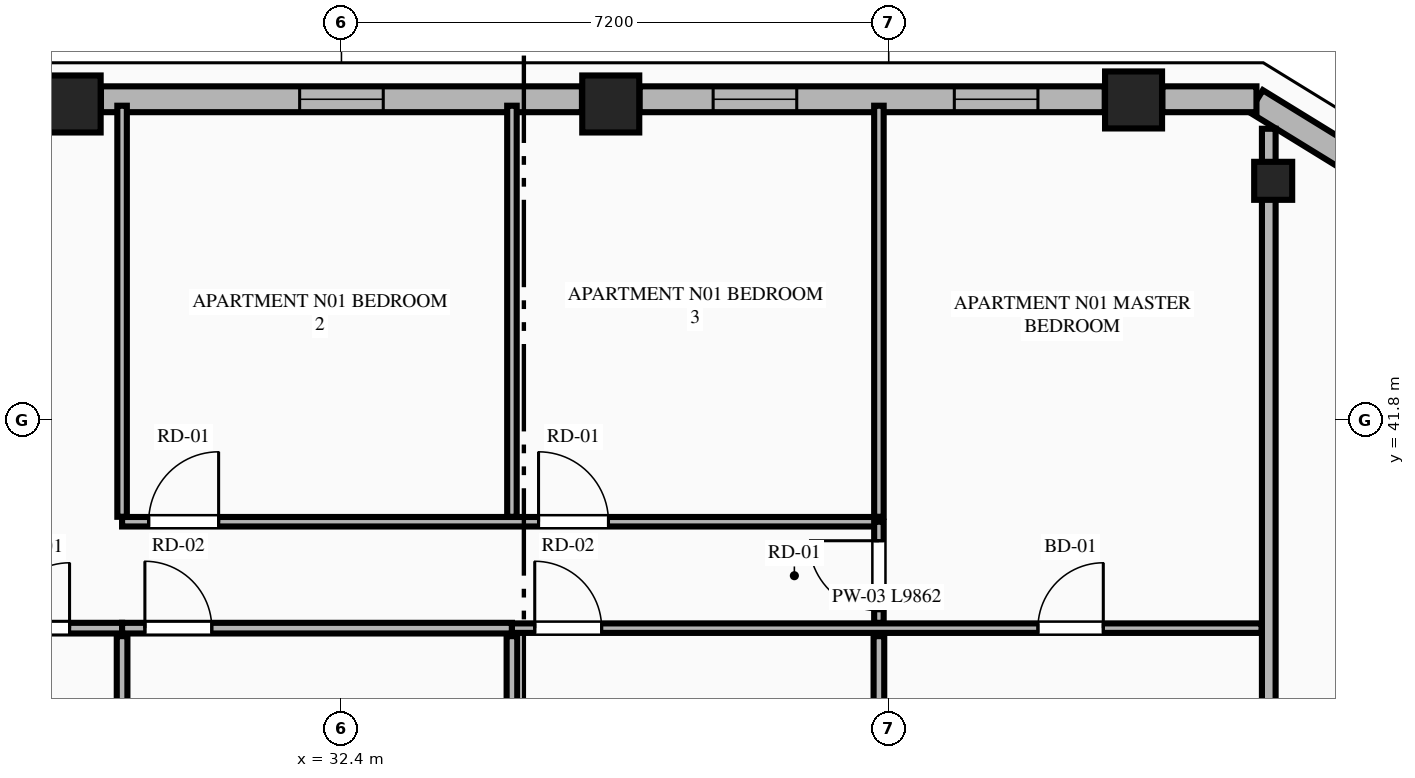
"""IFC4 building model, lengths in metres.
Left out: names, types, materials, properties, quantities, classifications, styles, units other than length and angle.
Written with IfcOpenShell. Run it as: python <this file> out.ifc"""

import sys

from ifc_helpers import new_model, si_unit, direction, frame, frame_2d, origin, origin_2d, place, context, subcontext, project, spatial, rectangle, extrude, element, fill, save


model = new_model("IFC4")
c1 = context("Model", 3, precision=1e-05, world=origin(), true_north=direction((0.0, 1.0)))
c2 = subcontext(c1, "Body", "Model", "MODEL_VIEW")
j1 = project(units=[si_unit("LENGTHUNIT", "METRE"), si_unit("PLANEANGLEUNIT", "RADIAN")], contexts=[c1])
p1 = place(None, origin())
s1 = spatial("IfcSite", under=j1, at=p1, CompositionType="ELEMENT")
p2 = place(p1, origin())
s2 = spatial("IfcBuilding", under=s1, at=p2, CompositionType="ELEMENT")
p3 = place(p2, frame((0.0, 0.0, 210.95)))
s3 = spatial("IfcBuildingStorey", under=s2, at=p3, CompositionType="ELEMENT", Elevation=210.95)
for number, where, z_axis, x_axis in (
    (1, (42.821, 46.011, 0.0), (0.0, 0.0, 1.0), (1.0, 0.0, 0.0)),
    (2, (35.943, 45.958, 0.0), (0.0, 0.0, 1.0), (1.0, 0.0, 0.0)),
    (3, (28.857, 45.958, 0.0), (0.0, 0.0, 1.0), (1.0, 0.0, 0.0)),
):
    element("IfcColumn", number, at=place(p3, frame(where, z_axis=z_axis, x_axis=x_axis)), inside=s3, PredefinedType="COLUMN", context=c2, shape_type="SweptSolid", body=[
        extrude(rectangle(XDim=0.75, YDim=0.75, at=origin_2d()), origin(), (0.0, 0.0, 1.0), 3.55),
    ])
p4 = place(p3, frame((44.658, 44.947, 0.0), z_axis=(0.0, 0.0, 1.0), x_axis=(-0.865230187018, 0.501374833306, 0.0)))
e4 = element("IfcColumn", 4, at=p4, inside=s3, PredefinedType="PILASTER", context=c2, shape_type="SweptSolid", body=[
    extrude(rectangle(XDim=0.5, YDim=0.35, at=origin_2d()), origin(), (0.0, 0.0, 1.0), 3.55),
])
p5 = place(p3, frame((45.862, 45.116, 0.0), z_axis=(0.0, 0.0, 1.0), x_axis=(-0.851713271379, 0.524008113828, 0.0)))
e5 = element("IfcWall", 5, at=p5, inside=s3, PredefinedType="STANDARD", context=c2, shape_type="SweptSolid", body=[
    extrude(rectangle(XDim=1.678, YDim=0.34, at=frame_2d((0.839, 0.0))), origin(), (0.0, 0.0, 1.0), 3.35),
])
p6 = place(p3, frame((44.438, 46.02, 0.0), z_axis=(0.0, 0.0, 1.0), x_axis=(-1.0, 0.0, 0.0)))
e6 = element("IfcWall", 6, at=p6, inside=s3, PredefinedType="STANDARD", context=c2, shape_type="SweptSolid", body=[
    extrude(rectangle(XDim=1.238, YDim=0.34, at=frame_2d((0.619, 0.0))), origin(), (0.0, 0.0, 1.0), 3.35),
])
p7 = place(p3, frame((42.442, 46.02, 0.0), z_axis=(0.0, 0.0, 1.0), x_axis=(-1.0, 0.0, 0.0)))
e7 = element("IfcWall", 7, at=p7, inside=s3, PredefinedType="STANDARD", context=c2, shape_type="SweptSolid", body=[
    extrude(rectangle(XDim=6.12, YDim=0.34, at=frame_2d((3.06, 0.0))), origin(), (0.0, 0.0, 1.0), 2.883),
])
p8 = place(p7, frame((0.879, 0.0, 0.75)))
e8 = element("IfcOpeningElement", 8, at=p8, cuts=e7, PredefinedType="OPENING", context=c2, shape_type="SweptSolid", body=[
    extrude(rectangle(XDim=1.1, YDim=1.983, at=frame_2d((0.55, 0.991))), frame((0.0, 0.18, 0.0), z_axis=(0.0, -1.0, 0.0), x_axis=(1.0, 0.0, 0.0)), (0.0, 0.0, 1.0), 0.36),
])
p9 = place(p7, frame((4.052, 0.0, 0.75)))
e9 = element("IfcOpeningElement", 9, at=p9, cuts=e7, PredefinedType="OPENING", context=c2, shape_type="SweptSolid", body=[
    extrude(rectangle(XDim=1.1, YDim=1.983, at=frame_2d((0.55, 0.991))), frame((0.0, 0.18, 0.0), z_axis=(0.0, -1.0, 0.0), x_axis=(1.0, 0.0, 0.0)), (0.0, 0.0, 1.0), 0.36),
])
p10 = place(p3, frame((35.564, 46.02, 0.0), z_axis=(0.0, 0.0, 1.0), x_axis=(-1.0, 0.0, 0.0)))
e10 = element("IfcWall", 10, at=p10, inside=s3, PredefinedType="STANDARD", context=c2, shape_type="SweptSolid", body=[
    extrude(rectangle(XDim=6.328, YDim=0.34, at=frame_2d((3.164, 0.0))), origin(), (0.0, 0.0, 1.0), 2.883),
])
p11 = place(p10, frame((2.614, 0.0, 0.75)))
e11 = element("IfcOpeningElement", 11, at=p11, cuts=e10, PredefinedType="OPENING", context=c2, shape_type="SweptSolid", body=[
    extrude(rectangle(XDim=1.1, YDim=1.983, at=frame_2d((0.55, 0.991))), frame((0.0, 0.18, 0.0), z_axis=(0.0, -1.0, 0.0), x_axis=(1.0, 0.0, 0.0)), (0.0, 0.0, 1.0), 0.36),
])
p12 = place(p3, frame((44.6, 35.15, 0.0), z_axis=(0.0, 0.0, 1.0), x_axis=(0.0, 1.0, 0.0)))
e12 = element("IfcWall", 12, at=p12, inside=s3, PredefinedType="PARTITIONING", context=c2, shape_type="SweptSolid", body=[
    extrude(rectangle(XDim=10.482, YDim=0.18, at=frame_2d((5.241, 0.0))), origin(), (0.0, 0.0, 1.0), 3.35),
])
p13 = place(p3, frame((22.25, 39.062, 0.0), z_axis=(0.0, 0.0, 1.0), x_axis=(1.0, 0.0, 0.0)))
e13 = element("IfcWall", 13, at=p13, inside=s3, PredefinedType="PLUMBINGWALL", context=c2, shape_type="SweptSolid", body=[
    extrude(rectangle(XDim=7.264, YDim=0.14, at=frame_2d((3.632, 0.0))), origin(), (0.0, 0.0, 1.0), 3.35),
])
p14 = place(p13, frame((5.713, 0.0, 0.0)))
e14 = element("IfcOpeningElement", 14, at=p14, cuts=e13, PredefinedType="OPENING", context=c2, shape_type="SweptSolid", body=[
    extrude(rectangle(XDim=0.86, YDim=2.1, at=frame_2d((0.43, 1.05))), frame((0.0, 0.08, 0.0), z_axis=(0.0, -1.0, 0.0), x_axis=(1.0, 0.0, 0.0)), (0.0, 0.0, 1.0), 0.16),
])
p15 = place(p13, frame((0.26, 0.0, 0.0)))
e15 = element("IfcOpeningElement", 15, at=p15, cuts=e13, PredefinedType="OPENING", context=c2, shape_type="SweptSolid", body=[
    extrude(rectangle(XDim=0.88, YDim=2.15, at=frame_2d((0.44, 1.075))), frame((0.0, 0.08, 0.0), z_axis=(0.0, -1.0, 0.0), x_axis=(1.0, 0.0, 0.0)), (0.0, 0.0, 1.0), 0.16),
])
p16 = place(p13, frame((3.446, 0.0, 0.0)))
e16 = element("IfcOpeningElement", 16, at=p16, cuts=e13, PredefinedType="OPENING", context=c2, shape_type="SweptSolid", body=[
    extrude(rectangle(XDim=0.88, YDim=2.15, at=frame_2d((0.44, 1.075))), frame((0.0, 0.08, 0.0), z_axis=(0.0, -1.0, 0.0), x_axis=(1.0, 0.0, 0.0)), (0.0, 0.0, 1.0), 0.16),
])
p17 = place(p3, frame((29.514, 39.062, 0.0), z_axis=(0.0, 0.0, 1.0), x_axis=(1.0, 0.0, 0.0)))
e17 = element("IfcWall", 17, at=p17, inside=s3, PredefinedType="PLUMBINGWALL", context=c2, shape_type="SweptSolid", body=[
    extrude(rectangle(XDim=5.129, YDim=0.14, at=frame_2d((2.564, 0.0))), origin(), (0.0, 0.0, 1.0), 3.35),
])
p18 = place(p17, frame((0.3, 0.0, 0.0)))
e18 = element("IfcOpeningElement", 18, at=p18, cuts=e17, PredefinedType="OPENING", context=c2, shape_type="SweptSolid", body=[
    extrude(rectangle(XDim=0.88, YDim=2.15, at=frame_2d((0.44, 1.075))), frame((0.0, 0.08, 0.0), z_axis=(0.0, -1.0, 0.0), x_axis=(1.0, 0.0, 0.0)), (0.0, 0.0, 1.0), 0.16),
])
p19 = place(p3, frame((34.643, 39.062, 0.0), z_axis=(0.0, 0.0, 1.0), x_axis=(1.0, 0.0, 0.0)))
e19 = element("IfcWall", 19, at=p19, inside=s3, PredefinedType="PARTITIONING", context=c2, shape_type="SweptSolid", body=[
    extrude(rectangle(XDim=9.862, YDim=0.125, at=frame_2d((4.931, 0.0))), origin(), (0.0, 0.0, 1.0), 3.35),
])
p20 = place(p19, frame((6.92, 0.0, 0.0)))
e20 = element("IfcOpeningElement", 20, at=p20, cuts=e19, PredefinedType="OPENING", context=c2, shape_type="SweptSolid", body=[
    extrude(rectangle(XDim=0.86, YDim=2.1, at=frame_2d((0.43, 1.05))), frame((0.0, 0.073, 0.0), z_axis=(0.0, -1.0, 0.0), x_axis=(1.0, 0.0, 0.0)), (0.0, 0.0, 1.0), 0.145),
])
p21 = place(p19, frame((0.3, 0.0, 0.0)))
e21 = element("IfcOpeningElement", 21, at=p21, cuts=e19, PredefinedType="OPENING", context=c2, shape_type="SweptSolid", body=[
    extrude(rectangle(XDim=0.88, YDim=2.15, at=frame_2d((0.44, 1.075))), frame((0.0, 0.073, 0.0), z_axis=(0.0, -1.0, 0.0), x_axis=(1.0, 0.0, 0.0)), (0.0, 0.0, 1.0), 0.145),
])
p22 = place(p3, frame((29.514, 40.527, 0.0), z_axis=(0.0, 0.0, 1.0), x_axis=(0.0, 1.0, 0.0)))
e22 = element("IfcWall", 22, at=p22, inside=s3, PredefinedType="PARTITIONING", context=c2, shape_type="SweptSolid", body=[
    extrude(rectangle(XDim=5.408, YDim=0.125, at=frame_2d((2.704, 0.0))), origin(), (0.0, 0.0, 1.0), 3.35),
])
p23 = place(p3, frame((29.514, 40.462, 0.0), z_axis=(0.0, 0.0, 1.0), x_axis=(1.0, 0.0, 0.0)))
e23 = element("IfcWall", 23, at=p23, inside=s3, PredefinedType="PARTITIONING", context=c2, shape_type="SweptSolid", body=[
    extrude(rectangle(XDim=9.957, YDim=0.125, at=frame_2d((4.979, 0.0))), origin(), (0.0, 0.0, 1.0), 3.35),
])
p24 = place(p23, frame((0.35, 0.0, 0.0)))
e24 = element("IfcOpeningElement", 24, at=p24, cuts=e23, PredefinedType="OPENING", context=c2, shape_type="SweptSolid", body=[
    extrude(rectangle(XDim=0.92, YDim=2.15, at=frame_2d((0.46, 1.075))), frame((0.0, 0.073, 0.0), z_axis=(0.0, -1.0, 0.0), x_axis=(1.0, 0.0, 0.0)), (0.0, 0.0, 1.0), 0.145),
])
p25 = place(p23, frame((5.479, 0.0, 0.0)))
e25 = element("IfcOpeningElement", 25, at=p25, cuts=e23, PredefinedType="OPENING", context=c2, shape_type="SweptSolid", body=[
    extrude(rectangle(XDim=0.92, YDim=2.15, at=frame_2d((0.46, 1.075))), frame((0.0, 0.073, 0.0), z_axis=(0.0, -1.0, 0.0), x_axis=(1.0, 0.0, 0.0)), (0.0, 0.0, 1.0), 0.145),
])
p26 = place(p3, frame((39.471, 39.132, 0.0), z_axis=(0.0, 0.0, 1.0), x_axis=(0.0, 1.0, 0.0)))
e26 = element("IfcWall", 26, at=p26, inside=s3, PredefinedType="PARTITIONING", context=c2, shape_type="SweptSolid", body=[
    extrude(rectangle(XDim=1.33, YDim=0.125, at=frame_2d((0.665, 0.0))), origin(), (0.0, 0.0, 1.0), 3.35),
])
p27 = place(p26, frame((0.16, 0.0, 0.0)))
e27 = element("IfcOpeningElement", 27, at=p27, cuts=e26, PredefinedType="OPENING", context=c2, shape_type="SweptSolid", body=[
    extrude(rectangle(XDim=0.92, YDim=2.15, at=frame_2d((0.46, 1.075))), frame((0.0, 0.073, 0.0), z_axis=(0.0, -1.0, 0.0), x_axis=(1.0, 0.0, 0.0)), (0.0, 0.0, 1.0), 0.145),
])
for number, where, z_axis, x_axis in (
    (28, (29.514, 35.235, 0.0), (0.0, 0.0, 1.0), (0.0, 1.0, 0.0)),
    (29, (34.643, 35.235, 0.0), (0.0, 0.0, 1.0), (0.0, 1.0, 0.0)),
):
    element("IfcWall", number, at=place(p3, frame(where, z_axis=z_axis, x_axis=x_axis)), inside=s3, PredefinedType="PLUMBINGWALL", context=c2, shape_type="SweptSolid", body=[
        extrude(rectangle(XDim=3.722, YDim=0.14, at=frame_2d((1.861, 0.0))), origin(), (0.0, 0.0, 1.0), 3.35),
    ])
for number, where, z_axis, x_axis in (
    (30, (34.643, 40.527, 0.0), (0.0, 0.0, 1.0), (0.0, 1.0, 0.0)),
    (31, (39.471, 40.527, 0.0), (0.0, 0.0, 1.0), (0.0, 1.0, 0.0)),
):
    element("IfcWall", number, at=place(p3, frame(where, z_axis=z_axis, x_axis=x_axis)), inside=s3, PredefinedType="PARTITIONING", context=c2, shape_type="SweptSolid", body=[
        extrude(rectangle(XDim=5.408, YDim=0.125, at=frame_2d((2.704, 0.0))), origin(), (0.0, 0.0, 1.0), 3.35),
    ])
p28 = place(p3, frame((39.471, 35.235, 0.0), z_axis=(0.0, 0.0, 1.0), x_axis=(0.0, 1.0, 0.0)))
e32 = element("IfcWall", 32, at=p28, inside=s3, PredefinedType="PLUMBINGWALL", context=c2, shape_type="SweptSolid", body=[
    extrude(rectangle(XDim=3.722, YDim=0.14, at=frame_2d((1.861, 0.0))), origin(), (0.0, 0.0, 1.0), 3.35),
])
p29 = place(p8, origin())
e33 = element("IfcWindow", 33, at=p29, inside=s3, PartitioningType="SINGLE_PANEL", PredefinedType="WINDOW", context=c2, shape_type="SweptSolid", body=[
    extrude(rectangle(XDim=1.1, YDim=1.983, at=frame_2d((0.55, 0.991))), frame((0.0, 0.03, 0.0), z_axis=(0.0, -1.0, 0.0), x_axis=(1.0, 0.0, 0.0)), (0.0, 0.0, 1.0), 0.06),
])
fill(e8, e33)
p30 = place(p11, origin())
e34 = element("IfcWindow", 34, at=p30, inside=s3, PartitioningType="SINGLE_PANEL", PredefinedType="WINDOW", context=c2, shape_type="SweptSolid", body=[
    extrude(rectangle(XDim=1.1, YDim=1.983, at=frame_2d((0.55, 0.991))), frame((0.0, 0.03, 0.0), z_axis=(0.0, -1.0, 0.0), x_axis=(1.0, 0.0, 0.0)), (0.0, 0.0, 1.0), 0.06),
])
fill(e11, e34)
p31 = place(p14, origin())
e35 = element("IfcDoor", 35, at=p31, inside=s3, OperationType="SINGLE_SWING_RIGHT", PredefinedType="DOOR", context=c2, shape_type="SweptSolid", body=[
    extrude(rectangle(XDim=0.86, YDim=2.1, at=frame_2d((0.43, 1.05))), frame((0.0, 0.025, 0.0), z_axis=(0.0, -1.0, 0.0), x_axis=(1.0, 0.0, 0.0)), (0.0, 0.0, 1.0), 0.05),
])
fill(e14, e35)
p32 = place(p20, origin())
e36 = element("IfcDoor", 36, at=p32, inside=s3, OperationType="SINGLE_SWING_RIGHT", PredefinedType="DOOR", context=c2, shape_type="SweptSolid", body=[
    extrude(rectangle(XDim=0.86, YDim=2.1, at=frame_2d((0.43, 1.05))), frame((0.0, 0.025, 0.0), z_axis=(0.0, -1.0, 0.0), x_axis=(1.0, 0.0, 0.0)), (0.0, 0.0, 1.0), 0.05),
])
fill(e20, e36)
p33 = place(p18, origin())
e37 = element("IfcDoor", 37, at=p33, inside=s3, OperationType="SINGLE_SWING_LEFT", PredefinedType="DOOR", context=c2, shape_type="SweptSolid", body=[
    extrude(rectangle(XDim=0.88, YDim=2.15, at=frame_2d((0.44, 1.075))), frame((0.0, 0.025, 0.0), z_axis=(0.0, -1.0, 0.0), x_axis=(1.0, 0.0, 0.0)), (0.0, 0.0, 1.0), 0.05),
])
fill(e18, e37)
p34 = place(p24, origin())
e38 = element("IfcDoor", 38, at=p34, inside=s3, OperationType="SINGLE_SWING_RIGHT", PredefinedType="DOOR", context=c2, shape_type="SweptSolid", body=[
    extrude(rectangle(XDim=0.92, YDim=2.15, at=frame_2d((0.46, 1.075))), frame((0.0, 0.025, 0.0), z_axis=(0.0, -1.0, 0.0), x_axis=(1.0, 0.0, 0.0)), (0.0, 0.0, 1.0), 0.05),
])
fill(e24, e38)
p35 = place(p25, origin())
e39 = element("IfcDoor", 39, at=p35, inside=s3, OperationType="SINGLE_SWING_LEFT", PredefinedType="DOOR", context=c2, shape_type="SweptSolid", body=[
    extrude(rectangle(XDim=0.92, YDim=2.15, at=frame_2d((0.46, 1.075))), frame((0.0, 0.025, 0.0), z_axis=(0.0, -1.0, 0.0), x_axis=(1.0, 0.0, 0.0)), (0.0, 0.0, 1.0), 0.05),
])
fill(e25, e39)
p36 = place(p27, origin())
e40 = element("IfcDoor", 40, at=p36, inside=s3, OperationType="SINGLE_SWING_RIGHT", PredefinedType="DOOR", context=c2, shape_type="SweptSolid", body=[
    extrude(rectangle(XDim=0.92, YDim=2.15, at=frame_2d((0.46, 1.075))), frame((0.0, 0.025, 0.0), z_axis=(0.0, -1.0, 0.0), x_axis=(1.0, 0.0, 0.0)), (0.0, 0.0, 1.0), 0.05),
])
fill(e27, e40)
p37 = place(p21, origin())
e41 = element("IfcDoor", 41, at=p37, inside=s3, OperationType="SINGLE_SWING_LEFT", PredefinedType="DOOR", context=c2, shape_type="SweptSolid", body=[
    extrude(rectangle(XDim=0.88, YDim=2.15, at=frame_2d((0.44, 1.075))), frame((0.0, 0.025, 0.0), z_axis=(0.0, -1.0, 0.0), x_axis=(1.0, 0.0, 0.0)), (0.0, 0.0, 1.0), 0.05),
])
fill(e21, e41)
p38 = place(p9, origin())
e42 = element("IfcWindow", 42, at=p38, inside=s3, PartitioningType="SINGLE_PANEL", PredefinedType="WINDOW", context=c2, shape_type="SweptSolid", body=[
    extrude(rectangle(XDim=1.1, YDim=1.983, at=frame_2d((0.55, 0.991))), frame((0.0, 0.03, 0.0), z_axis=(0.0, -1.0, 0.0), x_axis=(1.0, 0.0, 0.0)), (0.0, 0.0, 1.0), 0.06),
])
fill(e9, e42)
save(model, sys.argv[1])
